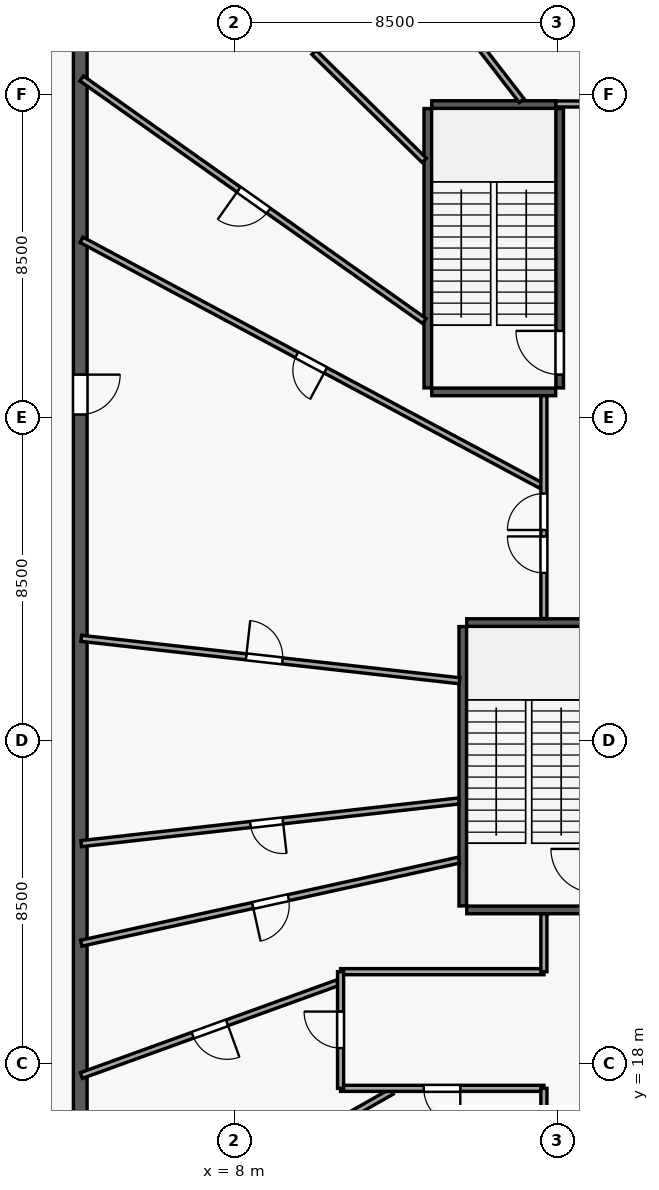
"""IFC4 building model, lengths in metres.
Left out: names, types, materials, properties, quantities, classifications, styles, units other than length and angle.
Written with IfcOpenShell. Run it as: python <this file> out.ifc"""

import sys

from ifc_helpers import new_model, si_unit, direction, frame, frame_2d, origin, origin_with_axes, origin_2d, place, context, subcontext, project, spatial, rectangle, circle, extrude, source, transform, mapped, element, fill, save


model = new_model("IFC4")
c1 = context("Model", 3, precision=1e-05, world=origin(), true_north=direction((0.0, 1.0)))
c2 = subcontext(c1, "Body", "Model", "MODEL_VIEW")
j1 = project(units=[si_unit("LENGTHUNIT", "METRE"), si_unit("PLANEANGLEUNIT", "RADIAN")], contexts=[c1])
p1 = place(None, origin())
s1 = spatial("IfcSite", under=j1, at=p1, CompositionType="ELEMENT")
p2 = place(p1, origin())
s2 = spatial("IfcBuilding", under=s1, at=p2, CompositionType="ELEMENT")
p3 = place(p2, frame((0.0, 0.0, 9.0)))
s3 = spatial("IfcBuildingStorey", under=s2, at=p3, CompositionType="ELEMENT", Elevation=9.0)
m1 = source(origin_with_axes(), c2, "Body", "SweptSolid", [
    extrude(circle(Radius=0.8, at=origin_2d()), origin(), (0.0, 0.0, 1.0), 4.5),
])
p4 = place(p3, frame((10.2, 26.5, 0.0), z_axis=(0.0, 0.0, 1.0), x_axis=(1.0, 0.0, 0.0)))
e1 = element("IfcColumn", 1, at=p4, inside=s3, PredefinedType="COLUMN", context=c2, shape_type="MappedRepresentation", body=[
    mapped(m1, transform((0.0, 0.0, 0.0), scale=1.0)),
])
p5 = place(p3, frame((3.95, 48.35, 0.0), z_axis=(0.0, 0.0, 1.0), x_axis=(0.0, -1.0, 0.0)))
e2 = element("IfcWall", 2, at=p5, inside=s3, PredefinedType="SOLIDWALL", context=c2, shape_type="SweptSolid", body=[
    extrude(rectangle(XDim=43.7, YDim=0.36, at=frame_2d((21.85, 0.0))), origin(), (0.0, 0.0, 1.0), 4.2),
])
p6 = place(p5, frame((1.439, 0.0, 0.85)))
e3 = element("IfcOpeningElement", 3, at=p6, cuts=e2, PredefinedType="OPENING", context=c2, shape_type="SweptSolid", body=[
    extrude(rectangle(XDim=1.8, YDim=2.2, at=frame_2d((0.9, 1.1))), frame((0.0, 0.19, 0.0), z_axis=(0.0, -1.0, 0.0), x_axis=(1.0, 0.0, 0.0)), (0.0, 0.0, 1.0), 0.38),
])
p7 = place(p5, frame((5.669, 0.0, 0.85)))
e4 = element("IfcOpeningElement", 4, at=p7, cuts=e2, PredefinedType="OPENING", context=c2, shape_type="SweptSolid", body=[
    extrude(rectangle(XDim=1.8, YDim=2.2, at=frame_2d((0.9, 1.1))), frame((0.0, 0.19, 0.0), z_axis=(0.0, -1.0, 0.0), x_axis=(1.0, 0.0, 0.0)), (0.0, 0.0, 1.0), 0.38),
])
p8 = place(p5, frame((15.485, 0.0, 0.85)))
e5 = element("IfcOpeningElement", 5, at=p8, cuts=e2, PredefinedType="OPENING", context=c2, shape_type="SweptSolid", body=[
    extrude(rectangle(XDim=1.8, YDim=2.2, at=frame_2d((0.9, 1.1))), frame((0.0, 0.19, 0.0), z_axis=(0.0, -1.0, 0.0), x_axis=(1.0, 0.0, 0.0)), (0.0, 0.0, 1.0), 0.38),
])
p9 = place(p5, frame((20.96, 0.0, 0.85)))
e6 = element("IfcOpeningElement", 6, at=p9, cuts=e2, PredefinedType="OPENING", context=c2, shape_type="SweptSolid", body=[
    extrude(rectangle(XDim=1.8, YDim=2.2, at=frame_2d((0.9, 1.1))), frame((0.0, 0.19, 0.0), z_axis=(0.0, -1.0, 0.0), x_axis=(1.0, 0.0, 0.0)), (0.0, 0.0, 1.0), 0.38),
])
p10 = place(p5, frame((28.012, 0.0, 0.85)))
e7 = element("IfcOpeningElement", 7, at=p10, cuts=e2, PredefinedType="OPENING", context=c2, shape_type="SweptSolid", body=[
    extrude(rectangle(XDim=1.8, YDim=2.2, at=frame_2d((0.9, 1.1))), frame((0.0, 0.19, 0.0), z_axis=(0.0, -1.0, 0.0), x_axis=(1.0, 0.0, 0.0)), (0.0, 0.0, 1.0), 0.38),
])
p11 = place(p5, frame((32.279, 0.0, 0.85)))
e8 = element("IfcOpeningElement", 8, at=p11, cuts=e2, PredefinedType="OPENING", context=c2, shape_type="SweptSolid", body=[
    extrude(rectangle(XDim=1.8, YDim=2.2, at=frame_2d((0.9, 1.1))), frame((0.0, 0.19, 0.0), z_axis=(0.0, -1.0, 0.0), x_axis=(1.0, 0.0, 0.0)), (0.0, 0.0, 1.0), 0.38),
])
p12 = place(p5, frame((37.578, 0.0, 0.85)))
e9 = element("IfcOpeningElement", 9, at=p12, cuts=e2, PredefinedType="OPENING", context=c2, shape_type="SweptSolid", body=[
    extrude(rectangle(XDim=1.8, YDim=2.2, at=frame_2d((0.9, 1.1))), frame((0.0, 0.19, 0.0), z_axis=(0.0, -1.0, 0.0), x_axis=(1.0, 0.0, 0.0)), (0.0, 0.0, 1.0), 0.38),
])
p13 = place(p5, frame((12.221, 0.0, 0.0)))
e10 = element("IfcOpeningElement", 10, at=p13, cuts=e2, PredefinedType="OPENING", context=c2, shape_type="SweptSolid", body=[
    extrude(rectangle(XDim=1.05, YDim=2.12, at=frame_2d((0.525, 1.06))), frame((0.0, 0.19, 0.0), z_axis=(0.0, -1.0, 0.0), x_axis=(1.0, 0.0, 0.0)), (0.0, 0.0, 1.0), 0.38),
])
p14 = place(p3, frame((14.015, 22.15, 0.0), z_axis=(0.0, 0.0, 1.0), x_axis=(0.0, 1.0, 0.0)))
e11 = element("IfcWall", 11, at=p14, inside=s3, PredefinedType="SHEAR", context=c2, shape_type="SweptSolid", body=[
    extrude(rectangle(XDim=7.35, YDim=0.2, at=frame_2d((3.675, 0.0))), origin(), (0.0, 0.0, 1.0), 4.2),
])
p15 = place(p3, frame((13.095, 35.78, 0.0), z_axis=(0.0, 0.0, 1.0), x_axis=(0.0, 1.0, 0.0)))
e12 = element("IfcWall", 12, at=p15, inside=s3, PredefinedType="SHEAR", context=c2, shape_type="SweptSolid", body=[
    extrude(rectangle(XDim=7.35, YDim=0.2, at=frame_2d((3.675, 0.0))), origin(), (0.0, 0.0, 1.0), 4.2),
])
p16 = place(p3, frame((16.565, 35.78, 0.0), z_axis=(0.0, 0.0, 1.0), x_axis=(0.0, 1.0, 0.0)))
e13 = element("IfcWall", 13, at=p16, inside=s3, PredefinedType="SHEAR", context=c2, shape_type="SweptSolid", body=[
    extrude(rectangle(XDim=7.35, YDim=0.2, at=frame_2d((3.675, 0.0))), origin(), (0.0, 0.0, 1.0), 4.2),
])
p17 = place(p16, frame((0.35, 0.0, 0.0)))
e14 = element("IfcOpeningElement", 14, at=p17, cuts=e13, PredefinedType="OPENING", context=c2, shape_type="SweptSolid", body=[
    extrude(rectangle(XDim=1.15, YDim=2.15, at=frame_2d((0.575, 1.075))), frame((0.0, 0.11, 0.0), z_axis=(0.0, -1.0, 0.0), x_axis=(1.0, 0.0, 0.0)), (0.0, 0.0, 1.0), 0.22),
])
for number, where, z_axis, x_axis in (
    (15, (13.2, 35.675, 0.0), (0.0, 0.0, 1.0), (1.0, 0.0, 0.0)),
    (16, (13.2, 43.235, 0.0), (0.0, 0.0, 1.0), (1.0, 0.0, 0.0)),
):
    element("IfcWall", number, at=place(p3, frame(where, z_axis=z_axis, x_axis=x_axis)), inside=s3, PredefinedType="SHEAR", context=c2, shape_type="SweptSolid", body=[
        extrude(rectangle(XDim=3.26, YDim=0.2, at=frame_2d((1.63, 0.0))), origin(), (0.0, 0.0, 1.0), 4.2),
    ])
for number, where, z_axis, x_axis in (
    (17, (14.12, 22.045, 0.0), (0.0, 0.0, 1.0), (1.0, 0.0, 0.0)),
    (18, (14.12, 29.605, 0.0), (0.0, 0.0, 1.0), (1.0, 0.0, 0.0)),
):
    element("IfcWall", number, at=place(p3, frame(where, z_axis=z_axis, x_axis=x_axis)), inside=s3, PredefinedType="SHEAR", context=c2, shape_type="SweptSolid", body=[
        extrude(rectangle(XDim=3.26, YDim=0.2, at=frame_2d((1.63, 0.0))), origin(), (0.0, 0.0, 1.0), 4.2),
    ])
p18 = place(p3, frame((16.068, 33.214, 0.0), z_axis=(0.0, 0.0, 1.0), x_axis=(-0.881886972295, 0.471460887132, 0.0)))
e19 = element("IfcWall", 19, at=p18, inside=s3, PredefinedType="PARTITIONING", context=c2, shape_type="SweptSolid", body=[
    extrude(rectangle(XDim=13.704, YDim=0.16, at=frame_2d((6.852, 0.0))), origin(), (0.0, 0.0, 1.0), 4.2),
])
p19 = place(p18, frame((6.422, 0.0, 0.0)))
e20 = element("IfcOpeningElement", 20, at=p19, cuts=e19, PredefinedType="OPENING", context=c2, shape_type="SweptSolid", body=[
    extrude(rectangle(XDim=0.86, YDim=2.04, at=frame_2d((0.43, 1.02))), frame((0.0, 0.09, 0.0), z_axis=(0.0, -1.0, 0.0), x_axis=(1.0, 0.0, 0.0)), (0.0, 0.0, 1.0), 0.18),
])
p20 = place(p3, frame((13.005, 37.54, 0.0), z_axis=(0.0, 0.0, 1.0), x_axis=(-0.816255020813, 0.577691735269, 0.0)))
e21 = element("IfcWall", 21, at=p20, inside=s3, PredefinedType="PARTITIONING", context=c2, shape_type="SweptSolid", body=[
    extrude(rectangle(XDim=11.048, YDim=0.16, at=frame_2d((5.524, 0.0))), origin(), (0.0, 0.0, 1.0), 4.2),
])
p21 = place(p20, frame((5.024, 0.0, 0.0)))
e22 = element("IfcOpeningElement", 22, at=p21, cuts=e21, PredefinedType="OPENING", context=c2, shape_type="SweptSolid", body=[
    extrude(rectangle(XDim=0.96, YDim=2.15, at=frame_2d((0.48, 1.075))), frame((0.0, 0.09, 0.0), z_axis=(0.0, -1.0, 0.0), x_axis=(1.0, 0.0, 0.0)), (0.0, 0.0, 1.0), 0.18),
])
p22 = place(p3, frame((13.913, 23.354, 0.0), z_axis=(0.0, 0.0, 1.0), x_axis=(-0.976669637868, -0.214747336346, 0.0)))
e23 = element("IfcWall", 23, at=p22, inside=s3, PredefinedType="PARTITIONING", context=c2, shape_type="SweptSolid", body=[
    extrude(rectangle(XDim=10.174, YDim=0.16, at=frame_2d((5.087, 0.0))), origin(), (0.0, 0.0, 1.0), 4.2),
])
p23 = place(p22, frame((4.594, 0.0, 0.0)))
e24 = element("IfcOpeningElement", 24, at=p23, cuts=e23, PredefinedType="OPENING", context=c2, shape_type="SweptSolid", body=[
    extrude(rectangle(XDim=0.96, YDim=2.15, at=frame_2d((0.48, 1.075))), frame((0.0, 0.09, 0.0), z_axis=(0.0, -1.0, 0.0), x_axis=(1.0, 0.0, 0.0)), (0.0, 0.0, 1.0), 0.18),
])
p24 = place(p3, frame((13.913, 24.912, 0.0), z_axis=(0.0, 0.0, 1.0), x_axis=(-0.993672362641, -0.112317566405, 0.0)))
e25 = element("IfcWall", 25, at=p24, inside=s3, PredefinedType="PARTITIONING", context=c2, shape_type="SweptSolid", body=[
    extrude(rectangle(XDim=10.001, YDim=0.16, at=frame_2d((5.0, 0.0))), origin(), (0.0, 0.0, 1.0), 4.2),
])
p25 = place(p24, frame((4.66, 0.0, 0.0)))
e26 = element("IfcOpeningElement", 26, at=p25, cuts=e25, PredefinedType="OPENING", context=c2, shape_type="SweptSolid", body=[
    extrude(rectangle(XDim=0.86, YDim=2.04, at=frame_2d((0.43, 1.02))), frame((0.0, 0.09, 0.0), z_axis=(0.0, -1.0, 0.0), x_axis=(1.0, 0.0, 0.0)), (0.0, 0.0, 1.0), 0.18),
])
p26 = place(p3, frame((3.975, 29.191, 0.0), z_axis=(0.0, 0.0, 1.0), x_axis=(0.993764244895, -0.111501684152, 0.0)))
e27 = element("IfcWall", 27, at=p26, inside=s3, PredefinedType="PARTITIONING", context=c2, shape_type="SweptSolid", body=[
    extrude(rectangle(XDim=10.015, YDim=0.16, at=frame_2d((5.008, 0.0))), origin(), (0.0, 0.0, 1.0), 4.2),
])
p27 = place(p26, frame((4.367, 0.0, 0.0)))
e28 = element("IfcOpeningElement", 28, at=p27, cuts=e27, PredefinedType="OPENING", context=c2, shape_type="SweptSolid", body=[
    extrude(rectangle(XDim=0.96, YDim=2.15, at=frame_2d((0.48, 1.075))), frame((0.0, 0.09, 0.0), z_axis=(0.0, -1.0, 0.0), x_axis=(1.0, 0.0, 0.0)), (0.0, 0.0, 1.0), 0.18),
])
p28 = place(p3, frame((12.146, 17.268, 0.0), z_axis=(0.0, 0.0, 1.0), x_axis=(-0.869250906181, -0.494371178472, 0.0)))
e29 = element("IfcWall", 29, at=p28, inside=s3, PredefinedType="PARTITIONING", context=c2, shape_type="SweptSolid", body=[
    extrude(rectangle(XDim=9.39, YDim=0.16, at=frame_2d((4.695, 0.0))), origin(), (0.0, 0.0, 1.0), 4.2),
])
p29 = place(p3, frame((15.565, 43.337, 0.0), z_axis=(0.0, 0.0, 1.0), x_axis=(-0.611449226112, 0.791283668407, 0.0)))
e30 = element("IfcWall", 30, at=p29, inside=s3, PredefinedType="PARTITIONING", context=c2, shape_type="SweptSolid", body=[
    extrude(rectangle(XDim=8.056, YDim=0.16, at=frame_2d((4.028, 0.0))), origin(), (0.0, 0.0, 1.0), 4.2),
])
p30 = place(p29, frame((3.535, 0.0, 0.0)))
e31 = element("IfcOpeningElement", 31, at=p30, cuts=e30, PredefinedType="OPENING", context=c2, shape_type="SweptSolid", body=[
    extrude(rectangle(XDim=0.96, YDim=2.15, at=frame_2d((0.48, 1.075))), frame((0.0, 0.09, 0.0), z_axis=(0.0, -1.0, 0.0), x_axis=(1.0, 0.0, 0.0)), (0.0, 0.0, 1.0), 0.18),
])
p31 = place(p3, frame((18.979, 43.332, 0.0), z_axis=(0.0, 0.0, 1.0), x_axis=(-0.495000650274, 0.868892603391, 0.0)))
e32 = element("IfcWall", 32, at=p31, inside=s3, PredefinedType="PARTITIONING", context=c2, shape_type="SweptSolid", body=[
    extrude(rectangle(XDim=7.348, YDim=0.16, at=frame_2d((3.674, 0.0))), origin(), (0.0, 0.0, 1.0), 4.2),
])
p32 = place(p3, frame((10.718, 20.126, 0.0), z_axis=(0.0, 0.0, 1.0), x_axis=(-0.940278821487, -0.340405255339, 0.0)))
e33 = element("IfcWall", 33, at=p32, inside=s3, PredefinedType="PARTITIONING", context=c2, shape_type="SweptSolid", body=[
    extrude(rectangle(XDim=7.167, YDim=0.16, at=frame_2d((3.583, 0.0))), origin(), (0.0, 0.0, 1.0), 4.2),
])
p33 = place(p32, frame((3.091, 0.0, 0.0)))
e34 = element("IfcOpeningElement", 34, at=p33, cuts=e33, PredefinedType="OPENING", context=c2, shape_type="SweptSolid", body=[
    extrude(rectangle(XDim=0.96, YDim=2.15, at=frame_2d((0.48, 1.075))), frame((0.0, 0.09, 0.0), z_axis=(0.0, -1.0, 0.0), x_axis=(1.0, 0.0, 0.0)), (0.0, 0.0, 1.0), 0.18),
])
p34 = place(p3, frame((16.15, 29.712, 0.0), z_axis=(0.0, 0.0, 1.0), x_axis=(0.0, 1.0, 0.0)))
e35 = element("IfcWall", 35, at=p34, inside=s3, PredefinedType="PARTITIONING", context=c2, shape_type="SweptSolid", body=[
    extrude(rectangle(XDim=5.861, YDim=0.16, at=frame_2d((2.93, 0.0))), origin(), (0.0, 0.0, 1.0), 4.2),
])
p35 = place(p34, frame((2.33, 0.0, 0.0)))
e36 = element("IfcOpeningElement", 36, at=p35, cuts=e35, PredefinedType="OPENING", context=c2, shape_type="SweptSolid", body=[
    extrude(rectangle(XDim=0.96, YDim=2.15, at=frame_2d((0.48, 1.075))), frame((0.0, 0.09, 0.0), z_axis=(0.0, -1.0, 0.0), x_axis=(1.0, 0.0, 0.0)), (0.0, 0.0, 1.0), 0.18),
])
p36 = place(p34, frame((1.2, 0.0, 0.0)))
e37 = element("IfcOpeningElement", 37, at=p36, cuts=e35, PredefinedType="OPENING", context=c2, shape_type="SweptSolid", body=[
    extrude(rectangle(XDim=0.96, YDim=2.15, at=frame_2d((0.48, 1.075))), frame((0.0, 0.09, 0.0), z_axis=(0.0, -1.0, 0.0), x_axis=(1.0, 0.0, 0.0)), (0.0, 0.0, 1.0), 0.18),
])
p37 = place(p3, frame((16.15, 17.35, 0.0), z_axis=(0.0, 0.0, 1.0), x_axis=(-1.0, 0.0, 0.0)))
e38 = element("IfcWall", 38, at=p37, inside=s3, PredefinedType="PARTITIONING", context=c2, shape_type="SweptSolid", body=[
    extrude(rectangle(XDim=5.35, YDim=0.16, at=frame_2d((2.675, 0.0))), origin(), (0.0, 0.0, 1.0), 4.2),
])
p38 = place(p37, frame((2.2, 0.0, 0.0)))
e39 = element("IfcOpeningElement", 39, at=p38, cuts=e38, PredefinedType="OPENING", context=c2, shape_type="SweptSolid", body=[
    extrude(rectangle(XDim=0.96, YDim=2.15, at=frame_2d((0.48, 1.075))), frame((0.0, 0.09, 0.0), z_axis=(0.0, -1.0, 0.0), x_axis=(1.0, 0.0, 0.0)), (0.0, 0.0, 1.0), 0.18),
])
p39 = place(p3, frame((10.8, 20.42, 0.0), z_axis=(0.0, 0.0, 1.0), x_axis=(1.0, 0.0, 0.0)))
e40 = element("IfcWall", 40, at=p39, inside=s3, PredefinedType="PARTITIONING", context=c2, shape_type="SweptSolid", body=[
    extrude(rectangle(XDim=5.35, YDim=0.16, at=frame_2d((2.675, 0.0))), origin(), (0.0, 0.0, 1.0), 3.25),
])
p40 = place(p3, frame((13.004, 41.766, 0.0), z_axis=(0.0, 0.0, 1.0), x_axis=(-0.714278297669, 0.699861781696, 0.0)))
e41 = element("IfcWall", 41, at=p40, inside=s3, PredefinedType="PARTITIONING", context=c2, shape_type="SweptSolid", body=[
    extrude(rectangle(XDim=4.064, YDim=0.16, at=frame_2d((2.032, 0.0))), origin(), (0.0, 0.0, 1.0), 4.2),
])
p41 = place(p3, frame((10.8, 17.35, 0.0), z_axis=(0.0, 0.0, 1.0), x_axis=(0.0, 1.0, 0.0)))
e42 = element("IfcWall", 42, at=p41, inside=s3, PredefinedType="PARTITIONING", context=c2, shape_type="SweptSolid", body=[
    extrude(rectangle(XDim=3.07, YDim=0.16, at=frame_2d((1.535, 0.0))), origin(), (0.0, 0.0, 1.0), 3.25),
])
p42 = place(p41, frame((1.06, 0.0, 0.0)))
e43 = element("IfcOpeningElement", 43, at=p42, cuts=e42, PredefinedType="OPENING", context=c2, shape_type="SweptSolid", body=[
    extrude(rectangle(XDim=0.96, YDim=2.15, at=frame_2d((0.48, 1.075))), frame((0.0, 0.09, 0.0), z_axis=(0.0, -1.0, 0.0), x_axis=(1.0, 0.0, 0.0)), (0.0, 0.0, 1.0), 0.18),
])
p43 = place(p3, frame((16.465, 43.25, 0.0), z_axis=(0.0, 0.0, 1.0), x_axis=(1.0, 0.0, 0.0)))
e44 = element("IfcWall", 44, at=p43, inside=s3, PredefinedType="PARTITIONING", context=c2, shape_type="SweptSolid", body=[
    extrude(rectangle(XDim=3.015, YDim=0.16, at=frame_2d((1.507, 0.0))), origin(), (0.0, 0.0, 1.0), 4.2),
])
p44 = place(p43, frame((1.035, 0.0, 0.0)))
e45 = element("IfcOpeningElement", 45, at=p44, cuts=e44, PredefinedType="OPENING", context=c2, shape_type="SweptSolid", body=[
    extrude(rectangle(XDim=0.96, YDim=2.15, at=frame_2d((0.48, 1.075))), frame((0.0, 0.09, 0.0), z_axis=(0.0, -1.0, 0.0), x_axis=(1.0, 0.0, 0.0)), (0.0, 0.0, 1.0), 0.18),
])
p45 = place(p3, frame((16.15, 14.95, 0.0), z_axis=(0.0, 0.0, 1.0), x_axis=(0.0, 1.0, 0.0)))
e46 = element("IfcWall", 46, at=p45, inside=s3, PredefinedType="PARTITIONING", context=c2, shape_type="SweptSolid", body=[
    extrude(rectangle(XDim=2.4, YDim=0.16, at=frame_2d((1.2, 0.0))), origin(), (0.0, 0.0, 1.0), 3.25),
])
p46 = place(p3, frame((16.15, 20.42, 0.0), z_axis=(0.0, 0.0, 1.0), x_axis=(0.0, 1.0, 0.0)))
e47 = element("IfcWall", 47, at=p46, inside=s3, PredefinedType="PARTITIONING", context=c2, shape_type="SweptSolid", body=[
    extrude(rectangle(XDim=1.518, YDim=0.16, at=frame_2d((0.759, 0.0))), origin(), (0.0, 0.0, 1.0), 4.2),
])
m2 = source(origin_with_axes(), c2, "Body", "SweptSolid", [
    extrude(rectangle(XDim=1.8, YDim=2.2, at=frame_2d((0.9, 1.1))), frame((0.0, 0.03, 0.0), z_axis=(0.0, -1.0, 0.0), x_axis=(1.0, 0.0, 0.0)), (0.0, 0.0, 1.0), 0.06),
])
p47 = place(p7, origin())
e48 = element("IfcWindow", 48, at=p47, inside=s3, PartitioningType="SINGLE_PANEL", PredefinedType="WINDOW", context=c2, shape_type="MappedRepresentation", body=[
    mapped(m2, transform((0.0, 0.0, 0.0), scale=1.0)),
])
fill(e4, e48)
p48 = place(p8, origin())
e49 = element("IfcWindow", 49, at=p48, inside=s3, PartitioningType="SINGLE_PANEL", PredefinedType="WINDOW", context=c2, shape_type="MappedRepresentation", body=[
    mapped(m2, transform((0.0, 0.0, 0.0), scale=1.0)),
])
fill(e5, e49)
p49 = place(p9, origin())
e50 = element("IfcWindow", 50, at=p49, inside=s3, PartitioningType="SINGLE_PANEL", PredefinedType="WINDOW", context=c2, shape_type="MappedRepresentation", body=[
    mapped(m2, transform((0.0, 0.0, 0.0), scale=1.0)),
])
fill(e6, e50)
p50 = place(p10, origin())
e51 = element("IfcWindow", 51, at=p50, inside=s3, PartitioningType="SINGLE_PANEL", PredefinedType="WINDOW", context=c2, shape_type="MappedRepresentation", body=[
    mapped(m2, transform((0.0, 0.0, 0.0), scale=1.0)),
])
fill(e7, e51)
m3 = source(origin_with_axes(), c2, "Body", "SweptSolid", [
    extrude(rectangle(XDim=1.05, YDim=2.12, at=frame_2d((0.525, 1.06))), frame((0.0, 0.025, 0.0), z_axis=(0.0, -1.0, 0.0), x_axis=(1.0, 0.0, 0.0)), (0.0, 0.0, 1.0), 0.05),
])
p51 = place(p13, origin())
e52 = element("IfcDoor", 52, at=p51, inside=s3, OperationType="SINGLE_SWING_LEFT", PredefinedType="DOOR", context=c2, shape_type="MappedRepresentation", body=[
    mapped(m3, transform((0.0, 0.0, 0.0), scale=1.0)),
])
fill(e10, e52)
m4 = source(origin_with_axes(), c2, "Body", "SweptSolid", [
    extrude(rectangle(XDim=1.15, YDim=2.15, at=frame_2d((0.575, 1.075))), frame((0.0, 0.025, 0.0), z_axis=(0.0, -1.0, 0.0), x_axis=(1.0, 0.0, 0.0)), (0.0, 0.0, 1.0), 0.05),
])
p52 = place(p17, origin())
e53 = element("IfcDoor", 53, at=p52, inside=s3, OperationType="SINGLE_SWING_RIGHT", PredefinedType="DOOR", context=c2, shape_type="MappedRepresentation", body=[
    mapped(m4, transform((0.0, 0.0, 0.0), scale=1.0)),
])
fill(e14, e53)
m5 = source(origin_with_axes(), c2, "Body", "SweptSolid", [
    extrude(rectangle(XDim=0.96, YDim=2.15, at=frame_2d((0.48, 1.075))), frame((0.0, 0.025, 0.0), z_axis=(0.0, -1.0, 0.0), x_axis=(1.0, 0.0, 0.0)), (0.0, 0.0, 1.0), 0.05),
])
p53 = place(p27, origin())
e54 = element("IfcDoor", 54, at=p53, inside=s3, OperationType="SINGLE_SWING_LEFT", PredefinedType="DOOR", context=c2, shape_type="MappedRepresentation", body=[
    mapped(m5, transform((0.0, 0.0, 0.0), scale=1.0)),
])
fill(e28, e54)
p54 = place(p23, origin())
e55 = element("IfcDoor", 55, at=p54, inside=s3, OperationType="SINGLE_SWING_RIGHT", PredefinedType="DOOR", context=c2, shape_type="MappedRepresentation", body=[
    mapped(m5, transform((0.0, 0.0, 0.0), scale=1.0)),
])
fill(e24, e55)
p55 = place(p33, origin())
e56 = element("IfcDoor", 56, at=p55, inside=s3, OperationType="SINGLE_SWING_LEFT", PredefinedType="DOOR", context=c2, shape_type="MappedRepresentation", body=[
    mapped(m5, transform((0.0, 0.0, 0.0), scale=1.0)),
])
fill(e34, e56)
p56 = place(p42, origin())
e57 = element("IfcDoor", 57, at=p56, inside=s3, OperationType="SINGLE_SWING_RIGHT", PredefinedType="DOOR", context=c2, shape_type="MappedRepresentation", body=[
    mapped(m5, transform((0.0, 0.0, 0.0), scale=1.0)),
])
fill(e43, e57)
p57 = place(p38, origin())
e58 = element("IfcDoor", 58, at=p57, inside=s3, OperationType="SINGLE_SWING_LEFT", PredefinedType="DOOR", context=c2, shape_type="MappedRepresentation", body=[
    mapped(m5, transform((0.0, 0.0, 0.0), scale=1.0)),
])
fill(e39, e58)
p58 = place(p21, origin())
e59 = element("IfcDoor", 59, at=p58, inside=s3, OperationType="SINGLE_SWING_RIGHT", PredefinedType="DOOR", context=c2, shape_type="MappedRepresentation", body=[
    mapped(m5, transform((0.0, 0.0, 0.0), scale=1.0)),
])
fill(e22, e59)
p59 = place(p35, origin())
e60 = element("IfcDoor", 60, at=p59, inside=s3, OperationType="SINGLE_SWING_LEFT", PredefinedType="DOOR", context=c2, shape_type="MappedRepresentation", body=[
    mapped(m5, transform((0.0, 0.0, 0.0), scale=1.0)),
])
fill(e36, e60)
p60 = place(p36, origin())
e61 = element("IfcDoor", 61, at=p60, inside=s3, OperationType="SINGLE_SWING_RIGHT", PredefinedType="DOOR", context=c2, shape_type="MappedRepresentation", body=[
    mapped(m5, transform((0.0, 0.0, 0.0), scale=1.0)),
])
fill(e37, e61)
m6 = source(origin_with_axes(), c2, "Body", "SweptSolid", [
    extrude(rectangle(XDim=0.86, YDim=2.04, at=frame_2d((0.43, 1.02))), frame((0.0, 0.025, 0.0), z_axis=(0.0, -1.0, 0.0), x_axis=(1.0, 0.0, 0.0)), (0.0, 0.0, 1.0), 0.05),
])
p61 = place(p25, origin())
e62 = element("IfcDoor", 62, at=p61, inside=s3, OperationType="SINGLE_SWING_LEFT", PredefinedType="DOOR", context=c2, shape_type="MappedRepresentation", body=[
    mapped(m6, transform((0.0, 0.0, 0.0), scale=1.0)),
])
fill(e26, e62)
p62 = place(p19, origin())
e63 = element("IfcDoor", 63, at=p62, inside=s3, OperationType="SINGLE_SWING_LEFT", PredefinedType="DOOR", context=c2, shape_type="MappedRepresentation", body=[
    mapped(m6, transform((0.0, 0.0, 0.0), scale=1.0)),
])
fill(e20, e63)
save(model, sys.argv[1])
